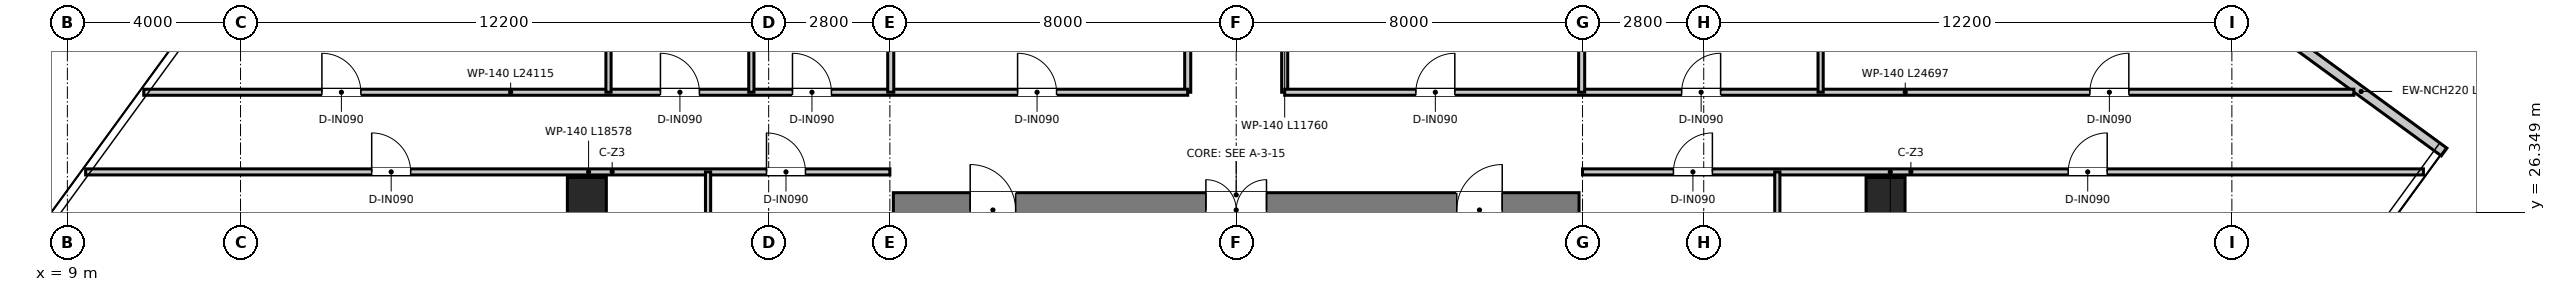
"""IFC4 building model, lengths in metres.
Left out: names, types, materials, properties, quantities, classifications, styles, units other than length and angle.
Written with IfcOpenShell. Run it as: python <this file> out.ifc"""

import sys

from ifc_helpers import new_model, si_unit, direction, frame, frame_2d, origin, origin_2d, place, context, subcontext, project, spatial, rectangle, extrude, source, transform, mapped, element, fill, save


model = new_model("IFC4")
c1 = context("Model", 3, precision=1e-05, world=origin(), true_north=direction((0.0, 1.0)))
c2 = subcontext(c1, "Body", "Model", "MODEL_VIEW")
j1 = project(units=[si_unit("LENGTHUNIT", "METRE"), si_unit("PLANEANGLEUNIT", "RADIAN")], contexts=[c1])
p1 = place(None, origin())
s1 = spatial("IfcSite", under=j1, at=p1, CompositionType="ELEMENT")
p2 = place(p1, origin())
s2 = spatial("IfcBuilding", under=s1, at=p2, CompositionType="ELEMENT")
p3 = place(p2, frame((0.0, 0.0, 197.55)))
s3 = spatial("IfcBuildingStorey", under=s2, at=p3, CompositionType="ELEMENT", Elevation=197.55)
p4 = place(p3, frame((28.08, 26.4, 0.0), z_axis=(0.0, 0.0, 1.0), x_axis=(1.0, 0.0, 0.0)))
e1 = element("IfcWall", 1, at=p4, inside=s3, PredefinedType="SHEAR", context=c2, shape_type="SweptSolid", body=[
    extrude(rectangle(XDim=15.84, YDim=0.8, at=frame_2d((7.92, 0.0))), origin(), (0.0, 0.0, 1.0), 3.95),
])
p5 = place(p4, frame((7.22, 0.0, 0.0)))
e2 = element("IfcOpeningElement", 2, at=p5, cuts=e1, PredefinedType="OPENING", context=c2, shape_type="SweptSolid", body=[
    extrude(rectangle(XDim=1.4, YDim=2.2, at=frame_2d((0.7, 1.1))), frame((0.0, 0.41, 0.0), z_axis=(0.0, -1.0, 0.0), x_axis=(1.0, 0.0, 0.0)), (0.0, 0.0, 1.0), 0.82),
])
p6 = place(p4, frame((1.775, 0.0, 0.0)))
e3 = element("IfcOpeningElement", 3, at=p6, cuts=e1, PredefinedType="OPENING", context=c2, shape_type="SweptSolid", body=[
    extrude(rectangle(XDim=1.05, YDim=2.1, at=frame_2d((0.525, 1.05))), frame((0.0, 0.41, 0.0), z_axis=(0.0, -1.0, 0.0), x_axis=(1.0, 0.0, 0.0)), (0.0, 0.0, 1.0), 0.82),
])
p7 = place(p4, frame((13.015, 0.0, 0.0)))
e4 = element("IfcOpeningElement", 4, at=p7, cuts=e1, PredefinedType="OPENING", context=c2, shape_type="SweptSolid", body=[
    extrude(rectangle(XDim=1.05, YDim=2.1, at=frame_2d((0.525, 1.05))), frame((0.0, 0.41, 0.0), z_axis=(0.0, -1.0, 0.0), x_axis=(1.0, 0.0, 0.0)), (0.0, 0.0, 1.0), 0.82),
])
m1 = source(origin(), c2, "Body", "SweptSolid", [
    extrude(rectangle(XDim=0.9, YDim=0.9, at=origin_2d()), origin(), (0.0, 0.0, 1.0), 3.95),
])
for number, where, z_axis, x_axis in (
    (5, (21.0, 26.7, 0.0), (0.0, 0.0, 1.0), (1.0, 0.0, 0.0)),
    (6, (51.0, 26.7, 0.0), (0.0, 0.0, 1.0), (1.0, 0.0, 0.0)),
):
    element("IfcColumn", number, at=place(p3, frame(where, z_axis=z_axis, x_axis=x_axis)), inside=s3, PredefinedType="COLUMN", context=c2, shape_type="MappedRepresentation", body=[
        mapped(m1, transform((0.0, 0.0, 0.0), x_axis=(1.0, 0.0, 0.0), y_axis=(0.0, 1.0, 0.0), z_axis=(0.0, 0.0, 1.0), scale=1.0)),
    ])
p8 = place(p3, frame((63.903, 27.74, 0.0), z_axis=(0.0, 0.0, 1.0), x_axis=(-0.807718106916, 0.58956887618, 0.0)))
e7 = element("IfcWall", 7, at=p8, inside=s3, PredefinedType="ELEMENTEDWALL", context=c2, shape_type="SweptSolid", body=[
    extrude(rectangle(XDim=4.745, YDim=0.22, at=frame_2d((2.373, 0.0))), origin(), (0.0, 0.0, 1.0), 3.59),
])
p9 = place(p3, frame((34.88, 29.12, 0.0), z_axis=(0.0, 0.0, 1.0), x_axis=(0.0, 1.0, 0.0)))
e8 = element("IfcWall", 8, at=p9, inside=s3, PredefinedType="PARTITIONING", context=c2, shape_type="SweptSolid", body=[
    extrude(rectangle(XDim=11.76, YDim=0.14, at=frame_2d((5.88, 0.0))), origin(), (0.0, 0.0, 1.0), 2.95),
])
p10 = place(p9, frame((3.205, 0.0, 0.0)))
e9 = element("IfcOpeningElement", 9, at=p10, cuts=e8, PredefinedType="OPENING", context=c2, shape_type="SweptSolid", body=[
    extrude(rectangle(XDim=0.95, YDim=2.1, at=frame_2d((0.475, 1.05))), frame((0.0, 0.08, 0.0), z_axis=(0.0, -1.0, 0.0), x_axis=(1.0, 0.0, 0.0)), (0.0, 0.0, 1.0), 0.16),
])
p11 = place(p9, frame((8.02, 0.0, 0.0)))
e10 = element("IfcOpeningElement", 10, at=p11, cuts=e8, PredefinedType="OPENING", context=c2, shape_type="SweptSolid", body=[
    extrude(rectangle(XDim=0.9, YDim=2.1, at=frame_2d((0.45, 1.05))), frame((0.0, 0.08, 0.0), z_axis=(0.0, -1.0, 0.0), x_axis=(1.0, 0.0, 0.0)), (0.0, 0.0, 1.0), 0.16),
])
p12 = place(p3, frame((37.12, 29.12, 0.0), z_axis=(0.0, 0.0, 1.0), x_axis=(0.0, 1.0, 0.0)))
e11 = element("IfcWall", 11, at=p12, inside=s3, PredefinedType="PARTITIONING", context=c2, shape_type="SweptSolid", body=[
    extrude(rectangle(XDim=11.76, YDim=0.14, at=frame_2d((5.88, 0.0))), origin(), (0.0, 0.0, 1.0), 2.95),
])
p13 = place(p12, frame((4.085, 0.0, 0.0)))
e12 = element("IfcOpeningElement", 12, at=p13, cuts=e11, PredefinedType="OPENING", context=c2, shape_type="SweptSolid", body=[
    extrude(rectangle(XDim=0.95, YDim=2.1, at=frame_2d((0.475, 1.05))), frame((0.0, 0.08, 0.0), z_axis=(0.0, -1.0, 0.0), x_axis=(1.0, 0.0, 0.0)), (0.0, 0.0, 1.0), 0.16),
])
p14 = place(p12, frame((8.02, 0.0, 0.0)))
e13 = element("IfcOpeningElement", 13, at=p14, cuts=e11, PredefinedType="OPENING", context=c2, shape_type="SweptSolid", body=[
    extrude(rectangle(XDim=0.9, YDim=2.1, at=frame_2d((0.45, 1.05))), frame((0.0, 0.08, 0.0), z_axis=(0.0, -1.0, 0.0), x_axis=(1.0, 0.0, 0.0)), (0.0, 0.0, 1.0), 0.16),
])
p15 = place(p3, frame((10.765, 29.12, 0.0), z_axis=(0.0, 0.0, 1.0), x_axis=(1.0, 0.0, 0.0)))
e14 = element("IfcWall", 14, at=p15, inside=s3, PredefinedType="PARTITIONING", context=c2, shape_type="SweptSolid", body=[
    extrude(rectangle(XDim=24.115, YDim=0.14, at=frame_2d((12.058, 0.0))), origin(), (0.0, 0.0, 1.0), 2.95),
])
p16 = place(p15, frame((20.185, 0.0, 0.0)))
e15 = element("IfcOpeningElement", 15, at=p16, cuts=e14, PredefinedType="OPENING", context=c2, shape_type="SweptSolid", body=[
    extrude(rectangle(XDim=0.9, YDim=2.1, at=frame_2d((0.45, 1.05))), frame((0.0, 0.08, 0.0), z_axis=(0.0, -1.0, 0.0), x_axis=(1.0, 0.0, 0.0)), (0.0, 0.0, 1.0), 0.16),
])
p17 = place(p15, frame((4.115, 0.0, 0.0)))
e16 = element("IfcOpeningElement", 16, at=p17, cuts=e14, PredefinedType="OPENING", context=c2, shape_type="SweptSolid", body=[
    extrude(rectangle(XDim=0.9, YDim=2.1, at=frame_2d((0.45, 1.05))), frame((0.0, 0.08, 0.0), z_axis=(0.0, -1.0, 0.0), x_axis=(1.0, 0.0, 0.0)), (0.0, 0.0, 1.0), 0.16),
])
p18 = place(p15, frame((11.935, 0.0, 0.0)))
e17 = element("IfcOpeningElement", 17, at=p18, cuts=e14, PredefinedType="OPENING", context=c2, shape_type="SweptSolid", body=[
    extrude(rectangle(XDim=0.9, YDim=2.1, at=frame_2d((0.45, 1.05))), frame((0.0, 0.08, 0.0), z_axis=(0.0, -1.0, 0.0), x_axis=(1.0, 0.0, 0.0)), (0.0, 0.0, 1.0), 0.16),
])
p19 = place(p15, frame((14.985, 0.0, 0.0)))
e18 = element("IfcOpeningElement", 18, at=p19, cuts=e14, PredefinedType="OPENING", context=c2, shape_type="SweptSolid", body=[
    extrude(rectangle(XDim=0.9, YDim=2.1, at=frame_2d((0.45, 1.05))), frame((0.0, 0.08, 0.0), z_axis=(0.0, -1.0, 0.0), x_axis=(1.0, 0.0, 0.0)), (0.0, 0.0, 1.0), 0.16),
])
p20 = place(p3, frame((37.12, 29.12, 0.0), z_axis=(0.0, 0.0, 1.0), x_axis=(1.0, 0.0, 0.0)))
e19 = element("IfcWall", 19, at=p20, inside=s3, PredefinedType="PARTITIONING", context=c2, shape_type="SweptSolid", body=[
    extrude(rectangle(XDim=24.697, YDim=0.14, at=frame_2d((12.348, 0.0))), origin(), (0.0, 0.0, 1.0), 2.95),
])
p21 = place(p20, frame((3.03, 0.0, 0.0)))
e20 = element("IfcOpeningElement", 20, at=p21, cuts=e19, PredefinedType="OPENING", context=c2, shape_type="SweptSolid", body=[
    extrude(rectangle(XDim=0.9, YDim=2.1, at=frame_2d((0.45, 1.05))), frame((0.0, 0.08, 0.0), z_axis=(0.0, -1.0, 0.0), x_axis=(1.0, 0.0, 0.0)), (0.0, 0.0, 1.0), 0.16),
])
p22 = place(p20, frame((9.17, 0.0, 0.0)))
e21 = element("IfcOpeningElement", 21, at=p22, cuts=e19, PredefinedType="OPENING", context=c2, shape_type="SweptSolid", body=[
    extrude(rectangle(XDim=0.9, YDim=2.1, at=frame_2d((0.45, 1.05))), frame((0.0, 0.08, 0.0), z_axis=(0.0, -1.0, 0.0), x_axis=(1.0, 0.0, 0.0)), (0.0, 0.0, 1.0), 0.16),
])
p23 = place(p20, frame((18.6, 0.0, 0.0)))
e22 = element("IfcOpeningElement", 22, at=p23, cuts=e19, PredefinedType="OPENING", context=c2, shape_type="SweptSolid", body=[
    extrude(rectangle(XDim=0.9, YDim=2.1, at=frame_2d((0.45, 1.05))), frame((0.0, 0.08, 0.0), z_axis=(0.0, -1.0, 0.0), x_axis=(1.0, 0.0, 0.0)), (0.0, 0.0, 1.0), 0.16),
])
p24 = place(p3, frame((9.422, 27.28, 0.0), z_axis=(0.0, 0.0, 1.0), x_axis=(1.0, 0.0, 0.0)))
e23 = element("IfcWall", 23, at=p24, inside=s3, PredefinedType="PARTITIONING", context=c2, shape_type="SweptSolid", body=[
    extrude(rectangle(XDim=18.578, YDim=0.14, at=frame_2d((9.289, 0.0))), origin(), (0.0, 0.0, 1.0), 2.95),
])
p25 = place(p24, frame((6.608, 0.0, 0.0)))
e24 = element("IfcOpeningElement", 24, at=p25, cuts=e23, PredefinedType="OPENING", context=c2, shape_type="SweptSolid", body=[
    extrude(rectangle(XDim=0.9, YDim=2.1, at=frame_2d((0.45, 1.05))), frame((0.0, 0.08, 0.0), z_axis=(0.0, -1.0, 0.0), x_axis=(1.0, 0.0, 0.0)), (0.0, 0.0, 1.0), 0.16),
])
p26 = place(p24, frame((15.728, 0.0, 0.0)))
e25 = element("IfcOpeningElement", 25, at=p26, cuts=e23, PredefinedType="OPENING", context=c2, shape_type="SweptSolid", body=[
    extrude(rectangle(XDim=0.9, YDim=2.1, at=frame_2d((0.45, 1.05))), frame((0.0, 0.08, 0.0), z_axis=(0.0, -1.0, 0.0), x_axis=(1.0, 0.0, 0.0)), (0.0, 0.0, 1.0), 0.16),
])
p27 = place(p3, frame((44.0, 27.28, 0.0), z_axis=(0.0, 0.0, 1.0), x_axis=(1.0, 0.0, 0.0)))
e26 = element("IfcWall", 26, at=p27, inside=s3, PredefinedType="PARTITIONING", context=c2, shape_type="SweptSolid", body=[
    extrude(rectangle(XDim=19.425, YDim=0.14, at=frame_2d((9.712, 0.0))), origin(), (0.0, 0.0, 1.0), 2.95),
])
p28 = place(p27, frame((2.1, 0.0, 0.0)))
e27 = element("IfcOpeningElement", 27, at=p28, cuts=e26, PredefinedType="OPENING", context=c2, shape_type="SweptSolid", body=[
    extrude(rectangle(XDim=0.9, YDim=2.1, at=frame_2d((0.45, 1.05))), frame((0.0, 0.08, 0.0), z_axis=(0.0, -1.0, 0.0), x_axis=(1.0, 0.0, 0.0)), (0.0, 0.0, 1.0), 0.16),
])
p29 = place(p27, frame((11.22, 0.0, 0.0)))
e28 = element("IfcOpeningElement", 28, at=p29, cuts=e26, PredefinedType="OPENING", context=c2, shape_type="SweptSolid", body=[
    extrude(rectangle(XDim=0.9, YDim=2.1, at=frame_2d((0.45, 1.05))), frame((0.0, 0.08, 0.0), z_axis=(0.0, -1.0, 0.0), x_axis=(1.0, 0.0, 0.0)), (0.0, 0.0, 1.0), 0.16),
])
for number, where, z_axis, x_axis in (
    (29, (28.02, 29.12, 0.0), (0.0, 0.0, 1.0), (0.0, 1.0, 0.0)),
    (30, (43.98, 29.12, 0.0), (0.0, 0.0, 1.0), (0.0, 1.0, 0.0)),
):
    element("IfcWall", number, at=place(p3, frame(where, z_axis=z_axis, x_axis=x_axis)), inside=s3, PredefinedType="PARTITIONING", context=c2, shape_type="SweptSolid", body=[
        extrude(rectangle(XDim=5.46, YDim=0.14, at=frame_2d((2.73, 0.0))), origin(), (0.0, 0.0, 1.0), 3.23),
    ])
p30 = place(p3, frame((21.5, 29.12, 0.0), z_axis=(0.0, 0.0, 1.0), x_axis=(0.0, 1.0, 0.0)))
e31 = element("IfcWall", 31, at=p30, inside=s3, PredefinedType="PARTITIONING", context=c2, shape_type="SweptSolid", body=[
    extrude(rectangle(XDim=14.708, YDim=0.12, at=frame_2d((7.354, 0.0))), origin(), (0.0, 0.0, 1.0), 3.0),
])
p31 = place(p3, frame((24.8, 29.12, 0.0), z_axis=(0.0, 0.0, 1.0), x_axis=(0.0, 1.0, 0.0)))
e32 = element("IfcWall", 32, at=p31, inside=s3, PredefinedType="PARTITIONING", context=c2, shape_type="SweptSolid", body=[
    extrude(rectangle(XDim=19.229, YDim=0.12, at=frame_2d((9.615, 0.0))), origin(), (0.0, 0.0, 1.0), 3.0),
])
p32 = place(p3, frame((49.5, 29.12, 0.0), z_axis=(0.0, 0.0, 1.0), x_axis=(0.0, 1.0, 0.0)))
e33 = element("IfcWall", 33, at=p32, inside=s3, PredefinedType="PARTITIONING", context=c2, shape_type="SweptSolid", body=[
    extrude(rectangle(XDim=14.728, YDim=0.12, at=frame_2d((7.364, 0.0))), origin(), (0.0, 0.0, 1.0), 3.0),
])
p33 = place(p3, frame((23.8, 8.603, 0.0), z_axis=(0.0, 0.0, 1.0), x_axis=(0.0, 1.0, 0.0)))
e34 = element("IfcWall", 34, at=p33, inside=s3, PredefinedType="PARTITIONING", context=c2, shape_type="SweptSolid", body=[
    extrude(rectangle(XDim=18.677, YDim=0.12, at=frame_2d((9.338, 0.0))), origin(), (0.0, 0.0, 1.0), 3.0),
])
p34 = place(p3, frame((48.5, 6.832, 0.0), z_axis=(0.0, 0.0, 1.0), x_axis=(0.0, 1.0, 0.0)))
e35 = element("IfcWall", 35, at=p34, inside=s3, PredefinedType="PARTITIONING", context=c2, shape_type="SweptSolid", body=[
    extrude(rectangle(XDim=20.448, YDim=0.12, at=frame_2d((10.224, 0.0))), origin(), (0.0, 0.0, 1.0), 3.0),
])
p35 = place(p5, origin())
e36 = element("IfcDoor", 36, at=p35, inside=s3, OperationType="DOUBLE_DOOR_SINGLE_SWING", PredefinedType="DOOR", context=c2, shape_type="SweptSolid", body=[
    extrude(rectangle(XDim=1.4, YDim=2.2, at=frame_2d((0.7, 1.1))), frame((0.0, 0.025, 0.0), z_axis=(0.0, -1.0, 0.0), x_axis=(1.0, 0.0, 0.0)), (0.0, 0.0, 1.0), 0.05),
])
fill(e2, e36)
p36 = place(p6, origin())
e37 = element("IfcDoor", 37, at=p36, inside=s3, OperationType="SINGLE_SWING_LEFT", PredefinedType="DOOR", context=c2, shape_type="SweptSolid", body=[
    extrude(rectangle(XDim=1.05, YDim=2.1, at=frame_2d((0.525, 1.05))), frame((0.0, 0.025, 0.0), z_axis=(0.0, -1.0, 0.0), x_axis=(1.0, 0.0, 0.0)), (0.0, 0.0, 1.0), 0.05),
])
fill(e3, e37)
p37 = place(p7, origin())
e38 = element("IfcDoor", 38, at=p37, inside=s3, OperationType="SINGLE_SWING_RIGHT", PredefinedType="DOOR", context=c2, shape_type="SweptSolid", body=[
    extrude(rectangle(XDim=1.05, YDim=2.1, at=frame_2d((0.525, 1.05))), frame((0.0, 0.025, 0.0), z_axis=(0.0, -1.0, 0.0), x_axis=(1.0, 0.0, 0.0)), (0.0, 0.0, 1.0), 0.05),
])
fill(e4, e38)
p38 = place(p16, origin())
e39 = element("IfcDoor", 39, at=p38, inside=s3, OperationType="SINGLE_SWING_LEFT", PredefinedType="DOOR", context=c2, shape_type="SweptSolid", body=[
    extrude(rectangle(XDim=0.9, YDim=2.1, at=frame_2d((0.45, 1.05))), frame((0.0, 0.025, 0.0), z_axis=(0.0, -1.0, 0.0), x_axis=(1.0, 0.0, 0.0)), (0.0, 0.0, 1.0), 0.05),
])
fill(e15, e39)
p39 = place(p21, origin())
e40 = element("IfcDoor", 40, at=p39, inside=s3, OperationType="SINGLE_SWING_RIGHT", PredefinedType="DOOR", context=c2, shape_type="SweptSolid", body=[
    extrude(rectangle(XDim=0.9, YDim=2.1, at=frame_2d((0.45, 1.05))), frame((0.0, 0.025, 0.0), z_axis=(0.0, -1.0, 0.0), x_axis=(1.0, 0.0, 0.0)), (0.0, 0.0, 1.0), 0.05),
])
fill(e20, e40)
p40 = place(p17, origin())
e41 = element("IfcDoor", 41, at=p40, inside=s3, OperationType="SINGLE_SWING_LEFT", PredefinedType="DOOR", context=c2, shape_type="SweptSolid", body=[
    extrude(rectangle(XDim=0.9, YDim=2.1, at=frame_2d((0.45, 1.05))), frame((0.0, 0.025, 0.0), z_axis=(0.0, -1.0, 0.0), x_axis=(1.0, 0.0, 0.0)), (0.0, 0.0, 1.0), 0.05),
])
fill(e16, e41)
p41 = place(p18, origin())
e42 = element("IfcDoor", 42, at=p41, inside=s3, OperationType="SINGLE_SWING_LEFT", PredefinedType="DOOR", context=c2, shape_type="SweptSolid", body=[
    extrude(rectangle(XDim=0.9, YDim=2.1, at=frame_2d((0.45, 1.05))), frame((0.0, 0.025, 0.0), z_axis=(0.0, -1.0, 0.0), x_axis=(1.0, 0.0, 0.0)), (0.0, 0.0, 1.0), 0.05),
])
fill(e17, e42)
p42 = place(p19, origin())
e43 = element("IfcDoor", 43, at=p42, inside=s3, OperationType="SINGLE_SWING_LEFT", PredefinedType="DOOR", context=c2, shape_type="SweptSolid", body=[
    extrude(rectangle(XDim=0.9, YDim=2.1, at=frame_2d((0.45, 1.05))), frame((0.0, 0.025, 0.0), z_axis=(0.0, -1.0, 0.0), x_axis=(1.0, 0.0, 0.0)), (0.0, 0.0, 1.0), 0.05),
])
fill(e18, e43)
p43 = place(p22, origin())
e44 = element("IfcDoor", 44, at=p43, inside=s3, OperationType="SINGLE_SWING_RIGHT", PredefinedType="DOOR", context=c2, shape_type="SweptSolid", body=[
    extrude(rectangle(XDim=0.9, YDim=2.1, at=frame_2d((0.45, 1.05))), frame((0.0, 0.025, 0.0), z_axis=(0.0, -1.0, 0.0), x_axis=(1.0, 0.0, 0.0)), (0.0, 0.0, 1.0), 0.05),
])
fill(e21, e44)
p44 = place(p23, origin())
e45 = element("IfcDoor", 45, at=p44, inside=s3, OperationType="SINGLE_SWING_RIGHT", PredefinedType="DOOR", context=c2, shape_type="SweptSolid", body=[
    extrude(rectangle(XDim=0.9, YDim=2.1, at=frame_2d((0.45, 1.05))), frame((0.0, 0.025, 0.0), z_axis=(0.0, -1.0, 0.0), x_axis=(1.0, 0.0, 0.0)), (0.0, 0.0, 1.0), 0.05),
])
fill(e22, e45)
p45 = place(p25, origin())
e46 = element("IfcDoor", 46, at=p45, inside=s3, OperationType="SINGLE_SWING_LEFT", PredefinedType="DOOR", context=c2, shape_type="SweptSolid", body=[
    extrude(rectangle(XDim=0.9, YDim=2.1, at=frame_2d((0.45, 1.05))), frame((0.0, 0.025, 0.0), z_axis=(0.0, -1.0, 0.0), x_axis=(1.0, 0.0, 0.0)), (0.0, 0.0, 1.0), 0.05),
])
fill(e24, e46)
p46 = place(p26, origin())
e47 = element("IfcDoor", 47, at=p46, inside=s3, OperationType="SINGLE_SWING_LEFT", PredefinedType="DOOR", context=c2, shape_type="SweptSolid", body=[
    extrude(rectangle(XDim=0.9, YDim=2.1, at=frame_2d((0.45, 1.05))), frame((0.0, 0.025, 0.0), z_axis=(0.0, -1.0, 0.0), x_axis=(1.0, 0.0, 0.0)), (0.0, 0.0, 1.0), 0.05),
])
fill(e25, e47)
p47 = place(p28, origin())
e48 = element("IfcDoor", 48, at=p47, inside=s3, OperationType="SINGLE_SWING_RIGHT", PredefinedType="DOOR", context=c2, shape_type="SweptSolid", body=[
    extrude(rectangle(XDim=0.9, YDim=2.1, at=frame_2d((0.45, 1.05))), frame((0.0, 0.025, 0.0), z_axis=(0.0, -1.0, 0.0), x_axis=(1.0, 0.0, 0.0)), (0.0, 0.0, 1.0), 0.05),
])
fill(e27, e48)
p48 = place(p29, origin())
e49 = element("IfcDoor", 49, at=p48, inside=s3, OperationType="SINGLE_SWING_RIGHT", PredefinedType="DOOR", context=c2, shape_type="SweptSolid", body=[
    extrude(rectangle(XDim=0.9, YDim=2.1, at=frame_2d((0.45, 1.05))), frame((0.0, 0.025, 0.0), z_axis=(0.0, -1.0, 0.0), x_axis=(1.0, 0.0, 0.0)), (0.0, 0.0, 1.0), 0.05),
])
fill(e28, e49)
save(model, sys.argv[1])
